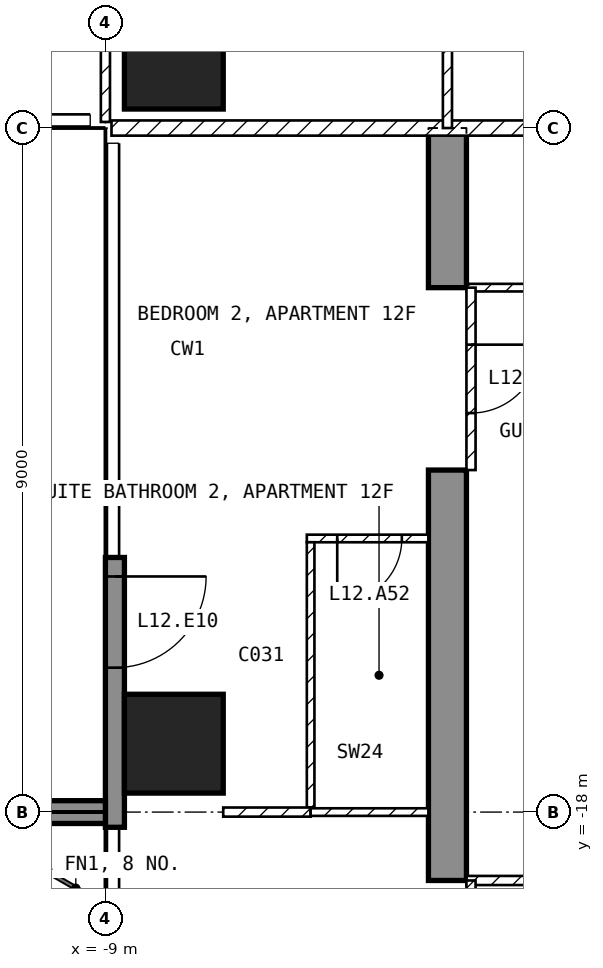
"""IFC4 building model, lengths in metres.
Left out: names, types, materials, properties, quantities, classifications, styles, units other than length and angle.
Written with IfcOpenShell. Run it as: python <this file> out.ifc"""

import sys

from ifc_helpers import new_model, si_unit, direction, frame, frame_2d, origin, origin_2d, place, context, subcontext, project, spatial, polyline, rectangle, outline, extrude, element, fill, save


model = new_model("IFC4")
c1 = context("Model", 3, precision=1e-05, world=origin(), true_north=direction((0.0, 1.0)))
c2 = subcontext(c1, "Body", "Model", "MODEL_VIEW")
j1 = project(units=[si_unit("LENGTHUNIT", "METRE"), si_unit("PLANEANGLEUNIT", "RADIAN")], contexts=[c1])
p1 = place(None, origin())
s1 = spatial("IfcSite", under=j1, at=p1, CompositionType="ELEMENT")
p2 = place(p1, origin())
s2 = spatial("IfcBuilding", under=s1, at=p2, CompositionType="ELEMENT")
p3 = place(p2, frame((0.0, 0.0, 61.0)))
s3 = spatial("IfcBuildingStorey", under=s2, at=p3, CompositionType="ELEMENT", Elevation=61.0)
for number, where, z_axis, x_axis in (
    (1, (-8.1, -17.1, -0.25), (0.0, 0.0, 1.0), (1.0, 0.0, 0.0)),
    (2, (-8.1, -8.1, -0.25), (0.0, 0.0, 1.0), (1.0, 0.0, 0.0)),
):
    element("IfcColumn", number, at=place(p3, frame(where, z_axis=z_axis, x_axis=x_axis)), inside=s3, PredefinedType="COLUMN", context=c2, shape_type="SweptSolid", body=[
        extrude(rectangle(XDim=1.3, YDim=1.3, at=origin_2d()), origin(), (0.0, 0.0, 1.0), 3.5),
    ])
p4 = place(p3, frame((-4.75, -25.45, -0.25), z_axis=(1.0, 0.0, 0.0), x_axis=(0.0, 1.0, 0.0)))
e3 = element("IfcWall", 3, at=p4, inside=s3, PredefinedType="SHEAR", context=c2, shape_type="SweptSolid", body=[
    extrude(outline(polyline([(0.0, 0.0), (4.15, 0.0), (4.15, 2.65), (6.55, 2.65), (6.55, 0.0), (11.95, 0.0), (11.95, 2.65), (14.35, 2.65), (14.35, 0.0), (16.45, 0.0), (16.45, 3.5), (0.0, 3.5), (0.0, 0.0)])), origin(), (0.0, 0.0, 1.0), 0.5),
])
p5 = place(p3, frame((-8.875, -14.65, 0.0), z_axis=(0.0, 0.0, 1.0), x_axis=(0.0, -1.0, 0.0)))
e4 = element("IfcWall", 4, at=p5, inside=s3, PredefinedType="SOLIDWALL", context=c2, shape_type="SweptSolid", body=[
    extrude(rectangle(XDim=3.55, YDim=0.25, at=frame_2d((1.775, 0.0))), origin(), (0.0, 0.0, 1.0), 3.25),
])
p6 = place(p5, frame((0.25, 0.0, 0.0)))
e5 = element("IfcOpeningElement", 5, at=p6, cuts=e4, PredefinedType="OPENING", context=c2, shape_type="SweptSolid", body=[
    extrude(rectangle(XDim=1.2, YDim=2.4, at=frame_2d((0.6, 1.2))), frame((0.0, 0.135, 0.0), z_axis=(0.0, -1.0, 0.0), x_axis=(1.0, 0.0, 0.0)), (0.0, 0.0, 1.0), 0.27),
])
p7 = place(p3, frame((-9.0, -18.0, 0.0), z_axis=(0.0, 0.0, 1.0), x_axis=(-1.0, 0.0, 0.0)))
e6 = element("IfcWall", 6, at=p7, inside=s3, PredefinedType="SOLIDWALL", context=c2, shape_type="SweptSolid", body=[
    extrude(rectangle(XDim=2.7, YDim=0.3, at=frame_2d((1.35, 0.0))), origin(), (0.0, 0.0, 1.0), 3.25),
])
p8 = place(p3, frame((8.92, -9.0, 0.0), z_axis=(0.0, 0.0, 1.0), x_axis=(-1.0, 0.0, 0.0)))
e7 = element("IfcWall", 7, at=p8, inside=s3, PredefinedType="PARTITIONING", context=c2, shape_type="SweptSolid", body=[
    extrude(rectangle(XDim=17.84, YDim=0.2, at=frame_2d((8.92, 0.0))), origin(), (0.0, 0.0, 1.0), 3.25),
])
p9 = place(p8, frame((8.42, 0.0, 0.0)))
e8 = element("IfcOpeningElement", 8, at=p9, cuts=e7, PredefinedType="OPENING", context=c2, shape_type="SweptSolid", body=[
    extrude(rectangle(XDim=1.0, YDim=2.1, at=frame_2d((0.5, 1.05))), frame((0.0, 0.11, 0.0), z_axis=(0.0, -1.0, 0.0), x_axis=(1.0, 0.0, 0.0)), (0.0, 0.0, 1.0), 0.22),
])
p10 = place(p3, frame((-9.0, -3.6, 0.0), z_axis=(0.0, 0.0, 1.0), x_axis=(0.0, -1.0, 0.0)))
e9 = element("IfcWall", 9, at=p10, inside=s3, PredefinedType="PARTITIONING", context=c2, shape_type="SweptSolid", body=[
    extrude(rectangle(XDim=5.32, YDim=0.12, at=frame_2d((2.66, 0.0))), origin(), (0.0, 0.0, 1.0), 3.25),
])
p11 = place(p10, frame((1.738, 0.0, 0.0)))
e10 = element("IfcOpeningElement", 10, at=p11, cuts=e9, PredefinedType="OPENING", context=c2, shape_type="SweptSolid", body=[
    extrude(rectangle(XDim=0.9, YDim=2.1, at=frame_2d((0.45, 1.05))), frame((0.0, 0.07, 0.0), z_axis=(0.0, -1.0, 0.0), x_axis=(1.0, 0.0, 0.0)), (0.0, 0.0, 1.0), 0.14),
])
p12 = place(p3, frame((-4.5, -1.3, 0.0), z_axis=(0.0, 0.0, 1.0), x_axis=(0.0, -1.0, 0.0)))
e11 = element("IfcWall", 11, at=p12, inside=s3, PredefinedType="PARTITIONING", context=c2, shape_type="SweptSolid", body=[
    extrude(rectangle(XDim=7.7, YDim=0.12, at=frame_2d((3.85, 0.0))), origin(), (0.0, 0.0, 1.0), 3.25),
])
p13 = place(p12, frame((4.988, 0.0, 0.0)))
e12 = element("IfcOpeningElement", 12, at=p13, cuts=e11, PredefinedType="OPENING", context=c2, shape_type="SweptSolid", body=[
    extrude(rectangle(XDim=0.9, YDim=2.1, at=frame_2d((0.45, 1.05))), frame((0.0, 0.07, 0.0), z_axis=(0.0, -1.0, 0.0), x_axis=(1.0, 0.0, 0.0)), (0.0, 0.0, 1.0), 0.14),
])
p14 = place(p3, frame((-2.1, -11.1, 0.0), z_axis=(0.0, 0.0, 1.0), x_axis=(-1.0, 0.0, 0.0)))
e13 = element("IfcWall", 13, at=p14, inside=s3, PredefinedType="PARTITIONING", context=c2, shape_type="SweptSolid", body=[
    extrude(rectangle(XDim=2.15, YDim=0.1, at=frame_2d((1.075, 0.0))), origin(), (0.0, 0.0, 1.0), 3.25),
])
p15 = place(p3, frame((4.25, -18.9, 0.0), z_axis=(0.0, 0.0, 1.0), x_axis=(-1.0, 0.0, 0.0)))
e14 = element("IfcWall", 14, at=p15, inside=s3, PredefinedType="PARTITIONING", context=c2, shape_type="SweptSolid", body=[
    extrude(rectangle(XDim=8.5, YDim=0.12, at=frame_2d((4.25, 0.0))), origin(), (0.0, 0.0, 1.0), 3.25),
])
p16 = place(p15, frame((1.925, 0.0, 0.0)))
e15 = element("IfcOpeningElement", 15, at=p16, cuts=e14, PredefinedType="OPENING", context=c2, shape_type="SweptSolid", body=[
    extrude(rectangle(XDim=0.9, YDim=2.1, at=frame_2d((0.45, 1.05))), frame((0.0, 0.07, 0.0), z_axis=(0.0, -1.0, 0.0), x_axis=(1.0, 0.0, 0.0)), (0.0, 0.0, 1.0), 0.14),
])
p17 = place(p3, frame((-4.75, -14.4, 0.0), z_axis=(0.0, 0.0, 1.0), x_axis=(-1.0, 0.0, 0.0)))
e16 = element("IfcWall", 16, at=p17, inside=s3, PredefinedType="PARTITIONING", context=c2, shape_type="SweptSolid", body=[
    extrude(rectangle(XDim=1.6, YDim=0.1, at=frame_2d((0.8, 0.0))), origin(), (0.0, 0.0, 1.0), 3.25),
])
p18 = place(p17, frame((0.35, 0.0, 0.0)))
e17 = element("IfcOpeningElement", 17, at=p18, cuts=e16, PredefinedType="OPENING", context=c2, shape_type="SweptSolid", body=[
    extrude(rectangle(XDim=0.85, YDim=2.1, at=frame_2d((0.425, 1.05))), frame((0.0, 0.06, 0.0), z_axis=(0.0, -1.0, 0.0), x_axis=(1.0, 0.0, 0.0)), (0.0, 0.0, 1.0), 0.12),
])
p19 = place(p3, frame((-6.3, -14.45, 0.0), z_axis=(0.0, 0.0, 1.0), x_axis=(0.0, -1.0, 0.0)))
e18 = element("IfcWall", 18, at=p19, inside=s3, PredefinedType="PARTITIONING", context=c2, shape_type="SweptSolid", body=[
    extrude(rectangle(XDim=3.49, YDim=0.1, at=frame_2d((1.745, 0.0))), origin(), (0.0, 0.0, 1.0), 3.25),
])
p20 = place(p3, frame((-6.3, -18.0, 0.0), z_axis=(0.0, 0.0, 1.0), x_axis=(-1.0, 0.0, 0.0)))
e19 = element("IfcWall", 19, at=p20, inside=s3, PredefinedType="PARTITIONING", context=c2, shape_type="SweptSolid", body=[
    extrude(rectangle(XDim=1.15, YDim=0.12, at=frame_2d((0.575, 0.0))), origin(), (0.0, 0.0, 1.0), 3.25),
])
p21 = place(p3, frame((-4.75, -18.0, 0.0), z_axis=(0.0, 0.0, 1.0), x_axis=(-1.0, 0.0, 0.0)))
e20 = element("IfcWall", 20, at=p21, inside=s3, PredefinedType="PARTITIONING", context=c2, shape_type="SweptSolid", body=[
    extrude(rectangle(XDim=1.55, YDim=0.1, at=frame_2d((0.775, 0.0))), origin(), (0.0, 0.0, 1.0), 3.25),
])
p22 = place(p3, frame((-4.19, -11.1, 0.0), z_axis=(0.0, 0.0, 1.0), x_axis=(0.0, -1.0, 0.0)))
e21 = element("IfcWall", 21, at=p22, inside=s3, PredefinedType="PARTITIONING", context=c2, shape_type="SweptSolid", body=[
    extrude(rectangle(XDim=2.4, YDim=0.12, at=frame_2d((1.2, 0.0))), origin(), (0.0, 0.0, 1.0), 2.4),
])
p23 = place(p22, frame((0.75, 0.0, 0.0)))
e22 = element("IfcOpeningElement", 22, at=p23, cuts=e21, PredefinedType="OPENING", context=c2, shape_type="SweptSolid", body=[
    extrude(rectangle(XDim=0.9, YDim=2.1, at=frame_2d((0.45, 1.05))), frame((0.0, 0.07, 0.0), z_axis=(0.0, -1.0, 0.0), x_axis=(1.0, 0.0, 0.0)), (0.0, 0.0, 1.0), 0.14),
])
p24 = place(p3, frame((-4.19, -18.9, 0.0), z_axis=(0.0, 0.0, 1.0), x_axis=(0.0, -1.0, 0.0)))
e23 = element("IfcWall", 23, at=p24, inside=s3, PredefinedType="PARTITIONING", context=c2, shape_type="SweptSolid", body=[
    extrude(rectangle(XDim=2.4, YDim=0.12, at=frame_2d((1.2, 0.0))), origin(), (0.0, 0.0, 1.0), 2.4),
])
p25 = place(p24, frame((0.75, 0.0, 0.0)))
e24 = element("IfcOpeningElement", 24, at=p25, cuts=e23, PredefinedType="OPENING", context=c2, shape_type="SweptSolid", body=[
    extrude(rectangle(XDim=0.9, YDim=2.1, at=frame_2d((0.45, 1.05))), frame((0.0, 0.07, 0.0), z_axis=(0.0, -1.0, 0.0), x_axis=(1.0, 0.0, 0.0)), (0.0, 0.0, 1.0), 0.14),
])
p26 = place(p6, origin())
e25 = element("IfcDoor", 25, at=p26, inside=s3, OperationType="SINGLE_SWING_LEFT", PredefinedType="DOOR", context=c2, shape_type="SweptSolid", body=[
    extrude(rectangle(XDim=1.2, YDim=2.4, at=frame_2d((0.6, 1.2))), frame((0.0, 0.025, 0.0), z_axis=(0.0, -1.0, 0.0), x_axis=(1.0, 0.0, 0.0)), (0.0, 0.0, 1.0), 0.05),
])
fill(e5, e25)
p27 = place(p18, origin())
e26 = element("IfcDoor", 26, at=p27, inside=s3, OperationType="SINGLE_SWING_RIGHT", PredefinedType="DOOR", context=c2, shape_type="SweptSolid", body=[
    extrude(rectangle(XDim=0.85, YDim=2.1, at=frame_2d((0.425, 1.05))), frame((0.0, 0.025, 0.0), z_axis=(0.0, -1.0, 0.0), x_axis=(1.0, 0.0, 0.0)), (0.0, 0.0, 1.0), 0.05),
])
fill(e17, e26)
p28 = place(p23, origin())
e27 = element("IfcDoor", 27, at=p28, inside=s3, OperationType="SINGLE_SWING_LEFT", PredefinedType="DOOR", context=c2, shape_type="SweptSolid", body=[
    extrude(rectangle(XDim=0.9, YDim=2.1, at=frame_2d((0.45, 1.05))), frame((0.0, 0.025, 0.0), z_axis=(0.0, -1.0, 0.0), x_axis=(1.0, 0.0, 0.0)), (0.0, 0.0, 1.0), 0.05),
])
fill(e22, e27)
save(model, sys.argv[1])
